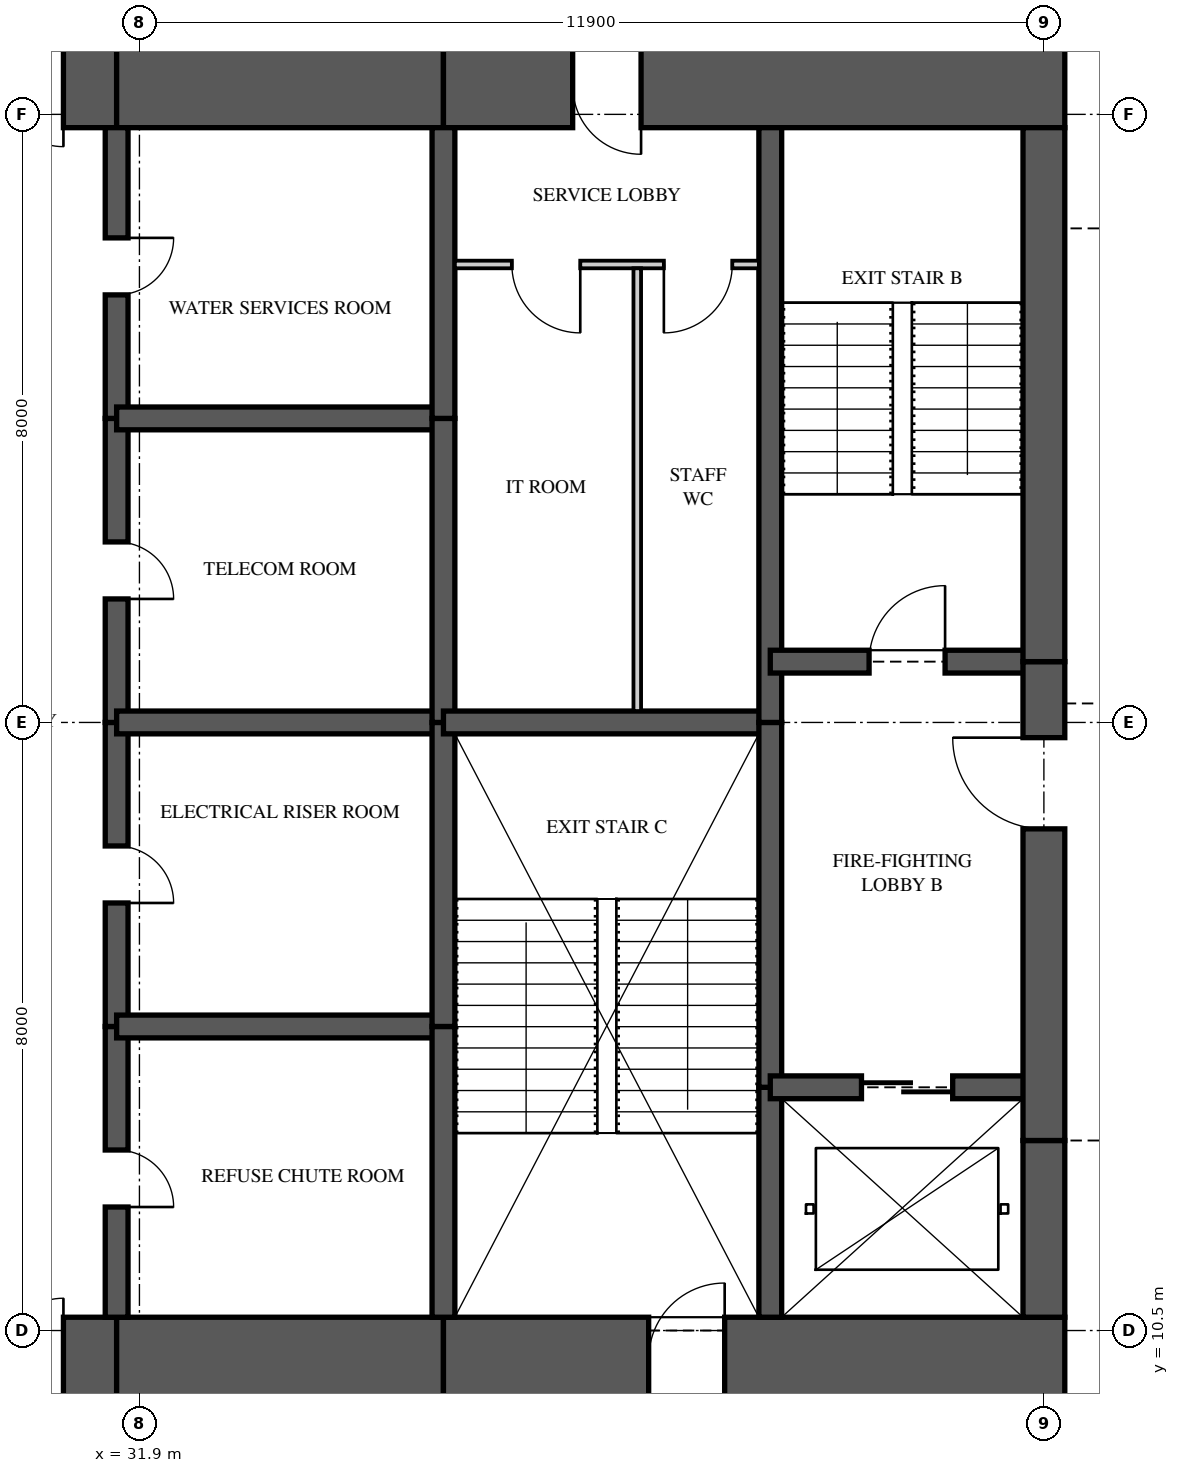
"""IFC4 building model, lengths in metres.
Left out: names, types, materials, properties, quantities, classifications, styles, units other than length and angle.
Written with IfcOpenShell. Run it as: python <this file> out.ifc"""

import sys

from ifc_helpers import new_model, si_unit, direction, frame, frame_2d, origin, place, context, subcontext, project, spatial, rectangle, extrude, element, fill, save


model = new_model("IFC4")
c1 = context("Model", 3, precision=1e-05, world=origin(), true_north=direction((0.0, 1.0)))
c2 = subcontext(c1, "Body", "Model", "MODEL_VIEW")
j1 = project(units=[si_unit("LENGTHUNIT", "METRE"), si_unit("PLANEANGLEUNIT", "RADIAN")], contexts=[c1])
p1 = place(None, origin())
s1 = spatial("IfcSite", under=j1, at=p1, CompositionType="ELEMENT")
p2 = place(p1, origin())
s2 = spatial("IfcBuilding", under=s1, at=p2, CompositionType="ELEMENT")
p3 = place(p2, frame((0.0, 0.0, 249.45)))
s3 = spatial("IfcBuildingStorey", under=s2, at=p3, CompositionType="ELEMENT", Elevation=249.45)
p4 = place(p3, frame((26.0, 10.125, 0.0), z_axis=(0.0, 0.0, 1.0), x_axis=(1.0, 0.0, 0.0)))
e1 = element("IfcWall", 1, at=p4, inside=s3, PredefinedType="SHEAR", context=c2, shape_type="SweptSolid", body=[
    extrude(rectangle(XDim=5.6, YDim=1.1, at=frame_2d((2.8, 0.0))), origin(), (0.0, 0.0, 1.0), 3.5),
])
p5 = place(p4, frame((3.3, 0.0, 0.0)))
e2 = element("IfcOpeningElement", 2, at=p5, cuts=e1, PredefinedType="OPENING", context=c2, shape_type="SweptSolid", body=[
    extrude(rectangle(XDim=1.6, YDim=2.1, at=frame_2d((0.8, 1.05))), frame((0.0, 0.56, 0.0), z_axis=(0.0, -1.0, 0.0), x_axis=(1.0, 0.0, 0.0)), (0.0, 0.0, 1.0), 1.12),
])
p6 = place(p3, frame((31.6, 10.125, 0.0), z_axis=(0.0, 0.0, 1.0), x_axis=(1.0, 0.0, 0.0)))
e3 = element("IfcWall", 3, at=p6, inside=s3, PredefinedType="SHEAR", context=c2, shape_type="SweptSolid", body=[
    extrude(rectangle(XDim=4.3, YDim=1.1, at=frame_2d((2.15, 0.0))), origin(), (0.0, 0.0, 1.0), 3.5),
])
p7 = place(p3, frame((35.9, 10.125, 0.0), z_axis=(0.0, 0.0, 1.0), x_axis=(1.0, 0.0, 0.0)))
e4 = element("IfcWall", 4, at=p7, inside=s3, PredefinedType="SHEAR", context=c2, shape_type="SweptSolid", body=[
    extrude(rectangle(XDim=8.175, YDim=1.1, at=frame_2d((4.087, 0.0))), origin(), (0.0, 0.0, 1.0), 3.5),
])
p8 = place(p7, frame((2.7, 0.0, 0.0)))
e5 = element("IfcOpeningElement", 5, at=p8, cuts=e4, PredefinedType="OPENING", context=c2, shape_type="SweptSolid", body=[
    extrude(rectangle(XDim=1.0, YDim=2.1, at=frame_2d((0.5, 1.05))), frame((0.0, 0.56, 0.0), z_axis=(0.0, -1.0, 0.0), x_axis=(1.0, 0.0, 0.0)), (0.0, 0.0, 1.0), 1.12),
])
p9 = place(p3, frame((44.075, 26.875, 0.0), z_axis=(0.0, 0.0, 1.0), x_axis=(-1.0, 0.0, 0.0)))
e6 = element("IfcWall", 6, at=p9, inside=s3, PredefinedType="SHEAR", context=c2, shape_type="SweptSolid", body=[
    extrude(rectangle(XDim=8.175, YDim=1.1, at=frame_2d((4.087, 0.0))), origin(), (0.0, 0.0, 1.0), 3.5),
])
p10 = place(p9, frame((5.575, 0.0, 0.0)))
e7 = element("IfcOpeningElement", 7, at=p10, cuts=e6, PredefinedType="OPENING", context=c2, shape_type="SweptSolid", body=[
    extrude(rectangle(XDim=0.9, YDim=2.1, at=frame_2d((0.45, 1.05))), frame((0.0, 0.56, 0.0), z_axis=(0.0, -1.0, 0.0), x_axis=(1.0, 0.0, 0.0)), (0.0, 0.0, 1.0), 1.12),
])
p11 = place(p3, frame((35.9, 26.875, 0.0), z_axis=(0.0, 0.0, 1.0), x_axis=(-1.0, 0.0, 0.0)))
e8 = element("IfcWall", 8, at=p11, inside=s3, PredefinedType="SHEAR", context=c2, shape_type="SweptSolid", body=[
    extrude(rectangle(XDim=4.3, YDim=1.1, at=frame_2d((2.15, 0.0))), origin(), (0.0, 0.0, 1.0), 3.5),
])
p12 = place(p3, frame((31.6, 26.875, 0.0), z_axis=(0.0, 0.0, 1.0), x_axis=(-1.0, 0.0, 0.0)))
e9 = element("IfcWall", 9, at=p12, inside=s3, PredefinedType="SHEAR", context=c2, shape_type="SweptSolid", body=[
    extrude(rectangle(XDim=5.6, YDim=1.1, at=frame_2d((2.8, 0.0))), origin(), (0.0, 0.0, 1.0), 3.5),
])
p13 = place(p12, frame((0.7, 0.0, 0.0)))
e10 = element("IfcOpeningElement", 10, at=p13, cuts=e9, PredefinedType="OPENING", context=c2, shape_type="SweptSolid", body=[
    extrude(rectangle(XDim=1.6, YDim=2.1, at=frame_2d((0.8, 1.05))), frame((0.0, 0.56, 0.0), z_axis=(0.0, -1.0, 0.0), x_axis=(1.0, 0.0, 0.0)), (0.0, 0.0, 1.0), 1.12),
])
p14 = place(p3, frame((43.8, 10.675, 0.0), z_axis=(0.0, 0.0, 1.0), x_axis=(0.0, 1.0, 0.0)))
e11 = element("IfcWall", 11, at=p14, inside=s3, PredefinedType="SHEAR", context=c2, shape_type="SweptSolid", body=[
    extrude(rectangle(XDim=2.325, YDim=0.55, at=frame_2d((1.163, 0.0))), origin(), (0.0, 0.0, 1.0), 3.5),
])
p15 = place(p3, frame((43.8, 13.0, 0.0), z_axis=(0.0, 0.0, 1.0), x_axis=(0.0, 1.0, 0.0)))
e12 = element("IfcWall", 12, at=p15, inside=s3, PredefinedType="SHEAR", context=c2, shape_type="SweptSolid", body=[
    extrude(rectangle(XDim=6.3, YDim=0.55, at=frame_2d((3.15, 0.0))), origin(), (0.0, 0.0, 1.0), 3.5),
])
p16 = place(p15, frame((4.1, 0.0, 0.0)))
e13 = element("IfcOpeningElement", 13, at=p16, cuts=e12, PredefinedType="OPENING", context=c2, shape_type="SweptSolid", body=[
    extrude(rectangle(XDim=1.2, YDim=2.2, at=frame_2d((0.6, 1.1))), frame((0.0, 0.285, 0.0), z_axis=(0.0, -1.0, 0.0), x_axis=(1.0, 0.0, 0.0)), (0.0, 0.0, 1.0), 0.57),
])
p17 = place(p3, frame((43.8, 19.3, 0.0), z_axis=(0.0, 0.0, 1.0), x_axis=(0.0, 1.0, 0.0)))
e14 = element("IfcWall", 14, at=p17, inside=s3, PredefinedType="SHEAR", context=c2, shape_type="SweptSolid", body=[
    extrude(rectangle(XDim=7.025, YDim=0.55, at=frame_2d((3.512, 0.0))), origin(), (0.0, 0.0, 1.0), 3.5),
])
p18 = place(p3, frame((31.6, 10.675, 0.0), z_axis=(0.0, 0.0, 1.0), x_axis=(0.0, 1.0, 0.0)))
e15 = element("IfcWall", 15, at=p18, inside=s3, PredefinedType="SHEAR", context=c2, shape_type="SweptSolid", body=[
    extrude(rectangle(XDim=3.825, YDim=0.3, at=frame_2d((1.913, 0.0))), origin(), (0.0, 0.0, 1.0), 3.5),
])
p19 = place(p18, frame((1.45, 0.0, 0.0)))
e16 = element("IfcOpeningElement", 16, at=p19, cuts=e15, PredefinedType="OPENING", context=c2, shape_type="SweptSolid", body=[
    extrude(rectangle(XDim=0.75, YDim=2.1, at=frame_2d((0.375, 1.05))), frame((0.0, 0.16, 0.0), z_axis=(0.0, -1.0, 0.0), x_axis=(1.0, 0.0, 0.0)), (0.0, 0.0, 1.0), 0.32),
])
p20 = place(p3, frame((31.6, 14.5, 0.0), z_axis=(0.0, 0.0, 1.0), x_axis=(0.0, 1.0, 0.0)))
e17 = element("IfcWall", 17, at=p20, inside=s3, PredefinedType="SHEAR", context=c2, shape_type="SweptSolid", body=[
    extrude(rectangle(XDim=4.0, YDim=0.3, at=frame_2d((2.0, 0.0))), origin(), (0.0, 0.0, 1.0), 3.5),
])
p21 = place(p20, frame((1.625, 0.0, 0.0)))
e18 = element("IfcOpeningElement", 18, at=p21, cuts=e17, PredefinedType="OPENING", context=c2, shape_type="SweptSolid", body=[
    extrude(rectangle(XDim=0.75, YDim=2.1, at=frame_2d((0.375, 1.05))), frame((0.0, 0.16, 0.0), z_axis=(0.0, -1.0, 0.0), x_axis=(1.0, 0.0, 0.0)), (0.0, 0.0, 1.0), 0.32),
])
p22 = place(p3, frame((31.6, 18.5, 0.0), z_axis=(0.0, 0.0, 1.0), x_axis=(0.0, 1.0, 0.0)))
e19 = element("IfcWall", 19, at=p22, inside=s3, PredefinedType="SHEAR", context=c2, shape_type="SweptSolid", body=[
    extrude(rectangle(XDim=4.0, YDim=0.3, at=frame_2d((2.0, 0.0))), origin(), (0.0, 0.0, 1.0), 3.5),
])
p23 = place(p22, frame((1.625, 0.0, 0.0)))
e20 = element("IfcOpeningElement", 20, at=p23, cuts=e19, PredefinedType="OPENING", context=c2, shape_type="SweptSolid", body=[
    extrude(rectangle(XDim=0.75, YDim=2.1, at=frame_2d((0.375, 1.05))), frame((0.0, 0.16, 0.0), z_axis=(0.0, -1.0, 0.0), x_axis=(1.0, 0.0, 0.0)), (0.0, 0.0, 1.0), 0.32),
])
p24 = place(p3, frame((31.6, 22.5, 0.0), z_axis=(0.0, 0.0, 1.0), x_axis=(0.0, 1.0, 0.0)))
e21 = element("IfcWall", 21, at=p24, inside=s3, PredefinedType="SHEAR", context=c2, shape_type="SweptSolid", body=[
    extrude(rectangle(XDim=3.825, YDim=0.3, at=frame_2d((1.913, 0.0))), origin(), (0.0, 0.0, 1.0), 3.5),
])
p25 = place(p24, frame((1.625, 0.0, 0.0)))
e22 = element("IfcOpeningElement", 22, at=p25, cuts=e21, PredefinedType="OPENING", context=c2, shape_type="SweptSolid", body=[
    extrude(rectangle(XDim=0.75, YDim=2.1, at=frame_2d((0.375, 1.05))), frame((0.0, 0.16, 0.0), z_axis=(0.0, -1.0, 0.0), x_axis=(1.0, 0.0, 0.0)), (0.0, 0.0, 1.0), 0.32),
])
p26 = place(p3, frame((35.9, 10.675, 0.0), z_axis=(0.0, 0.0, 1.0), x_axis=(0.0, 1.0, 0.0)))
e23 = element("IfcWall", 23, at=p26, inside=s3, PredefinedType="SHEAR", context=c2, shape_type="SweptSolid", body=[
    extrude(rectangle(XDim=3.825, YDim=0.3, at=frame_2d((1.913, 0.0))), origin(), (0.0, 0.0, 1.0), 3.5),
])
for number, where, z_axis, x_axis in (
    (24, (35.9, 14.5, 0.0), (0.0, 0.0, 1.0), (0.0, 1.0, 0.0)),
    (25, (35.9, 18.5, 0.0), (0.0, 0.0, 1.0), (0.0, 1.0, 0.0)),
):
    element("IfcWall", number, at=place(p3, frame(where, z_axis=z_axis, x_axis=x_axis)), inside=s3, PredefinedType="SHEAR", context=c2, shape_type="SweptSolid", body=[
        extrude(rectangle(XDim=4.0, YDim=0.3, at=frame_2d((2.0, 0.0))), origin(), (0.0, 0.0, 1.0), 3.5),
    ])
p27 = place(p3, frame((35.9, 22.5, 0.0), z_axis=(0.0, 0.0, 1.0), x_axis=(0.0, 1.0, 0.0)))
e26 = element("IfcWall", 26, at=p27, inside=s3, PredefinedType="SHEAR", context=c2, shape_type="SweptSolid", body=[
    extrude(rectangle(XDim=3.825, YDim=0.3, at=frame_2d((1.913, 0.0))), origin(), (0.0, 0.0, 1.0), 3.5),
])
p28 = place(p3, frame((40.2, 10.675, 0.0), z_axis=(0.0, 0.0, 1.0), x_axis=(0.0, 1.0, 0.0)))
e27 = element("IfcWall", 27, at=p28, inside=s3, PredefinedType="SHEAR", context=c2, shape_type="SweptSolid", body=[
    extrude(rectangle(XDim=3.025, YDim=0.3, at=frame_2d((1.512, 0.0))), origin(), (0.0, 0.0, 1.0), 3.5),
])
p29 = place(p3, frame((40.2, 13.7, 0.0), z_axis=(0.0, 0.0, 1.0), x_axis=(0.0, 1.0, 0.0)))
e28 = element("IfcWall", 28, at=p29, inside=s3, PredefinedType="SHEAR", context=c2, shape_type="SweptSolid", body=[
    extrude(rectangle(XDim=4.8, YDim=0.3, at=frame_2d((2.4, 0.0))), origin(), (0.0, 0.0, 1.0), 3.5),
])
p30 = place(p3, frame((40.2, 18.5, 0.0), z_axis=(0.0, 0.0, 1.0), x_axis=(0.0, 1.0, 0.0)))
e29 = element("IfcWall", 29, at=p30, inside=s3, PredefinedType="SHEAR", context=c2, shape_type="SweptSolid", body=[
    extrude(rectangle(XDim=7.825, YDim=0.3, at=frame_2d((3.913, 0.0))), origin(), (0.0, 0.0, 1.0), 3.5),
])
for number, where, z_axis, x_axis in (
    (30, (31.6, 14.5, 0.0), (0.0, 0.0, 1.0), (1.0, 0.0, 0.0)),
    (31, (31.6, 18.5, 0.0), (0.0, 0.0, 1.0), (1.0, 0.0, 0.0)),
    (32, (31.6, 22.5, 0.0), (0.0, 0.0, 1.0), (1.0, 0.0, 0.0)),
):
    element("IfcWall", number, at=place(p3, frame(where, z_axis=z_axis, x_axis=x_axis)), inside=s3, PredefinedType="SHEAR", context=c2, shape_type="SweptSolid", body=[
        extrude(rectangle(XDim=4.3, YDim=0.3, at=frame_2d((2.15, 0.0))), origin(), (0.0, 0.0, 1.0), 3.5),
    ])
p31 = place(p3, frame((35.9, 18.5, 0.0), z_axis=(0.0, 0.0, 1.0), x_axis=(1.0, 0.0, 0.0)))
e33 = element("IfcWall", 33, at=p31, inside=s3, PredefinedType="SHEAR", context=c2, shape_type="SweptSolid", body=[
    extrude(rectangle(XDim=4.3, YDim=0.3, at=frame_2d((2.15, 0.0))), origin(), (0.0, 0.0, 1.0), 3.5),
])
p32 = place(p3, frame((40.2, 13.7, 0.0), z_axis=(0.0, 0.0, 1.0), x_axis=(1.0, 0.0, 0.0)))
e34 = element("IfcWall", 34, at=p32, inside=s3, PredefinedType="SHEAR", context=c2, shape_type="SweptSolid", body=[
    extrude(rectangle(XDim=3.6, YDim=0.3, at=frame_2d((1.8, 0.0))), origin(), (0.0, 0.0, 1.0), 3.5),
])
p33 = place(p32, frame((1.2, 0.0, 0.0)))
e35 = element("IfcOpeningElement", 35, at=p33, cuts=e34, PredefinedType="OPENING", context=c2, shape_type="SweptSolid", body=[
    extrude(rectangle(XDim=1.2, YDim=2.1, at=frame_2d((0.6, 1.05))), frame((0.0, 0.16, 0.0), z_axis=(0.0, -1.0, 0.0), x_axis=(1.0, 0.0, 0.0)), (0.0, 0.0, 1.0), 0.32),
])
p34 = place(p3, frame((40.2, 19.3, 0.0), z_axis=(0.0, 0.0, 1.0), x_axis=(1.0, 0.0, 0.0)))
e36 = element("IfcWall", 36, at=p34, inside=s3, PredefinedType="SHEAR", context=c2, shape_type="SweptSolid", body=[
    extrude(rectangle(XDim=3.6, YDim=0.3, at=frame_2d((1.8, 0.0))), origin(), (0.0, 0.0, 1.0), 3.5),
])
p35 = place(p34, frame((1.3, 0.0, 0.0)))
e37 = element("IfcOpeningElement", 37, at=p35, cuts=e36, PredefinedType="OPENING", context=c2, shape_type="SweptSolid", body=[
    extrude(rectangle(XDim=1.0, YDim=2.1, at=frame_2d((0.5, 1.05))), frame((0.0, 0.16, 0.0), z_axis=(0.0, -1.0, 0.0), x_axis=(1.0, 0.0, 0.0)), (0.0, 0.0, 1.0), 0.32),
])
p36 = place(p3, frame((36.05, 24.525, 0.0), z_axis=(0.0, 0.0, 1.0), x_axis=(1.0, 0.0, 0.0)))
e38 = element("IfcWall", 38, at=p36, inside=s3, PredefinedType="PARTITIONING", context=c2, shape_type="SweptSolid", body=[
    extrude(rectangle(XDim=4.0, YDim=0.1, at=frame_2d((2.0, 0.0))), origin(), (0.0, 0.0, 1.0), 3.26),
])
p37 = place(p36, frame((0.75, 0.0, 0.0)))
e39 = element("IfcOpeningElement", 39, at=p37, cuts=e38, PredefinedType="OPENING", context=c2, shape_type="SweptSolid", body=[
    extrude(rectangle(XDim=0.9, YDim=2.1, at=frame_2d((0.45, 1.05))), frame((0.0, 0.06, 0.0), z_axis=(0.0, -1.0, 0.0), x_axis=(1.0, 0.0, 0.0)), (0.0, 0.0, 1.0), 0.12),
])
p38 = place(p36, frame((2.75, 0.0, 0.0)))
e40 = element("IfcOpeningElement", 40, at=p38, cuts=e38, PredefinedType="OPENING", context=c2, shape_type="SweptSolid", body=[
    extrude(rectangle(XDim=0.9, YDim=2.1, at=frame_2d((0.45, 1.05))), frame((0.0, 0.06, 0.0), z_axis=(0.0, -1.0, 0.0), x_axis=(1.0, 0.0, 0.0)), (0.0, 0.0, 1.0), 0.12),
])
p39 = place(p3, frame((38.45, 18.65, 0.0), z_axis=(0.0, 0.0, 1.0), x_axis=(0.0, 1.0, 0.0)))
e41 = element("IfcWall", 41, at=p39, inside=s3, PredefinedType="PARTITIONING", context=c2, shape_type="SweptSolid", body=[
    extrude(rectangle(XDim=5.825, YDim=0.1, at=frame_2d((2.913, 0.0))), origin(), (0.0, 0.0, 1.0), 3.26),
])
p40 = place(p37, frame((0.9, 0.0, 0.0), z_axis=(0.0, 0.0, 1.0), x_axis=(-1.0, 0.0, 0.0)))
e42 = element("IfcDoor", 42, at=p40, inside=s3, OperationType="SINGLE_SWING_LEFT", PredefinedType="DOOR", context=c2, shape_type="SweptSolid", body=[
    extrude(rectangle(XDim=0.9, YDim=2.1, at=frame_2d((0.45, 1.05))), frame((0.0, 0.025, 0.0), z_axis=(0.0, -1.0, 0.0), x_axis=(1.0, 0.0, 0.0)), (0.0, 0.0, 1.0), 0.05),
])
fill(e39, e42)
p41 = place(p38, frame((0.9, 0.0, 0.0), z_axis=(0.0, 0.0, 1.0), x_axis=(-1.0, 0.0, 0.0)))
e43 = element("IfcDoor", 43, at=p41, inside=s3, OperationType="SINGLE_SWING_RIGHT", PredefinedType="DOOR", context=c2, shape_type="SweptSolid", body=[
    extrude(rectangle(XDim=0.9, YDim=2.1, at=frame_2d((0.45, 1.05))), frame((0.0, 0.025, 0.0), z_axis=(0.0, -1.0, 0.0), x_axis=(1.0, 0.0, 0.0)), (0.0, 0.0, 1.0), 0.05),
])
fill(e40, e43)
p42 = place(p35, origin())
e44 = element("IfcDoor", 44, at=p42, inside=s3, OperationType="SINGLE_SWING_RIGHT", PredefinedType="DOOR", context=c2, shape_type="SweptSolid", body=[
    extrude(rectangle(XDim=1.0, YDim=2.1, at=frame_2d((0.5, 1.05))), frame((0.0, 0.025, 0.0), z_axis=(0.0, -1.0, 0.0), x_axis=(1.0, 0.0, 0.0)), (0.0, 0.0, 1.0), 0.05),
])
fill(e37, e44)
p43 = place(p16, origin())
e45 = element("IfcDoor", 45, at=p43, inside=s3, OperationType="SINGLE_SWING_RIGHT", PredefinedType="DOOR", context=c2, shape_type="SweptSolid", body=[
    extrude(rectangle(XDim=1.2, YDim=2.2, at=frame_2d((0.6, 1.1))), frame((0.0, 0.025, 0.0), z_axis=(0.0, -1.0, 0.0), x_axis=(1.0, 0.0, 0.0)), (0.0, 0.0, 1.0), 0.05),
])
fill(e13, e45)
p44 = place(p33, origin())
e46 = element("IfcDoor", 46, at=p44, inside=s3, OperationType="SLIDING_TO_LEFT", PredefinedType="DOOR", context=c2, shape_type="SweptSolid", body=[
    extrude(rectangle(XDim=1.2, YDim=2.1, at=frame_2d((0.6, 1.05))), frame((0.0, 0.025, 0.0), z_axis=(0.0, -1.0, 0.0), x_axis=(1.0, 0.0, 0.0)), (0.0, 0.0, 1.0), 0.05),
])
fill(e35, e46)
p45 = place(p5, origin())
e47 = element("IfcDoor", 47, at=p45, inside=s3, OperationType="DOUBLE_DOOR_SINGLE_SWING", PredefinedType="DOOR", context=c2, shape_type="SweptSolid", body=[
    extrude(rectangle(XDim=1.6, YDim=2.1, at=frame_2d((0.8, 1.05))), frame((0.0, 0.025, 0.0), z_axis=(0.0, -1.0, 0.0), x_axis=(1.0, 0.0, 0.0)), (0.0, 0.0, 1.0), 0.05),
])
fill(e2, e47)
p46 = place(p13, origin())
e48 = element("IfcDoor", 48, at=p46, inside=s3, OperationType="DOUBLE_DOOR_SINGLE_SWING", PredefinedType="DOOR", context=c2, shape_type="SweptSolid", body=[
    extrude(rectangle(XDim=1.6, YDim=2.1, at=frame_2d((0.8, 1.05))), frame((0.0, 0.025, 0.0), z_axis=(0.0, -1.0, 0.0), x_axis=(1.0, 0.0, 0.0)), (0.0, 0.0, 1.0), 0.05),
])
fill(e10, e48)
p47 = place(p19, frame((0.75, 0.0, 0.0), z_axis=(0.0, 0.0, 1.0), x_axis=(-1.0, 0.0, 0.0)))
e49 = element("IfcDoor", 49, at=p47, inside=s3, OperationType="SINGLE_SWING_RIGHT", PredefinedType="DOOR", context=c2, shape_type="SweptSolid", body=[
    extrude(rectangle(XDim=0.75, YDim=2.1, at=frame_2d((0.375, 1.05))), frame((0.0, 0.025, 0.0), z_axis=(0.0, -1.0, 0.0), x_axis=(1.0, 0.0, 0.0)), (0.0, 0.0, 1.0), 0.05),
])
fill(e16, e49)
p48 = place(p21, frame((0.75, 0.0, 0.0), z_axis=(0.0, 0.0, 1.0), x_axis=(-1.0, 0.0, 0.0)))
e50 = element("IfcDoor", 50, at=p48, inside=s3, OperationType="SINGLE_SWING_RIGHT", PredefinedType="DOOR", context=c2, shape_type="SweptSolid", body=[
    extrude(rectangle(XDim=0.75, YDim=2.1, at=frame_2d((0.375, 1.05))), frame((0.0, 0.025, 0.0), z_axis=(0.0, -1.0, 0.0), x_axis=(1.0, 0.0, 0.0)), (0.0, 0.0, 1.0), 0.05),
])
fill(e18, e50)
p49 = place(p23, frame((0.75, 0.0, 0.0), z_axis=(0.0, 0.0, 1.0), x_axis=(-1.0, 0.0, 0.0)))
e51 = element("IfcDoor", 51, at=p49, inside=s3, OperationType="SINGLE_SWING_RIGHT", PredefinedType="DOOR", context=c2, shape_type="SweptSolid", body=[
    extrude(rectangle(XDim=0.75, YDim=2.1, at=frame_2d((0.375, 1.05))), frame((0.0, 0.025, 0.0), z_axis=(0.0, -1.0, 0.0), x_axis=(1.0, 0.0, 0.0)), (0.0, 0.0, 1.0), 0.05),
])
fill(e20, e51)
p50 = place(p25, frame((0.75, 0.0, 0.0), z_axis=(0.0, 0.0, 1.0), x_axis=(-1.0, 0.0, 0.0)))
e52 = element("IfcDoor", 52, at=p50, inside=s3, OperationType="SINGLE_SWING_LEFT", PredefinedType="DOOR", context=c2, shape_type="SweptSolid", body=[
    extrude(rectangle(XDim=0.75, YDim=2.1, at=frame_2d((0.375, 1.05))), frame((0.0, 0.025, 0.0), z_axis=(0.0, -1.0, 0.0), x_axis=(1.0, 0.0, 0.0)), (0.0, 0.0, 1.0), 0.05),
])
fill(e22, e52)
p51 = place(p8, origin())
e53 = element("IfcDoor", 53, at=p51, inside=s3, OperationType="SINGLE_SWING_RIGHT", PredefinedType="DOOR", context=c2, shape_type="SweptSolid", body=[
    extrude(rectangle(XDim=1.0, YDim=2.1, at=frame_2d((0.5, 1.05))), frame((0.0, 0.025, 0.0), z_axis=(0.0, -1.0, 0.0), x_axis=(1.0, 0.0, 0.0)), (0.0, 0.0, 1.0), 0.05),
])
fill(e5, e53)
p52 = place(p10, origin())
e54 = element("IfcDoor", 54, at=p52, inside=s3, OperationType="SINGLE_SWING_LEFT", PredefinedType="DOOR", context=c2, shape_type="SweptSolid", body=[
    extrude(rectangle(XDim=0.9, YDim=2.1, at=frame_2d((0.45, 1.05))), frame((0.0, 0.47, 0.0), z_axis=(0.0, -1.0, 0.0), x_axis=(1.0, 0.0, 0.0)), (0.0, 0.0, 1.0), 0.8),
])
fill(e7, e54)
save(model, sys.argv[1])
